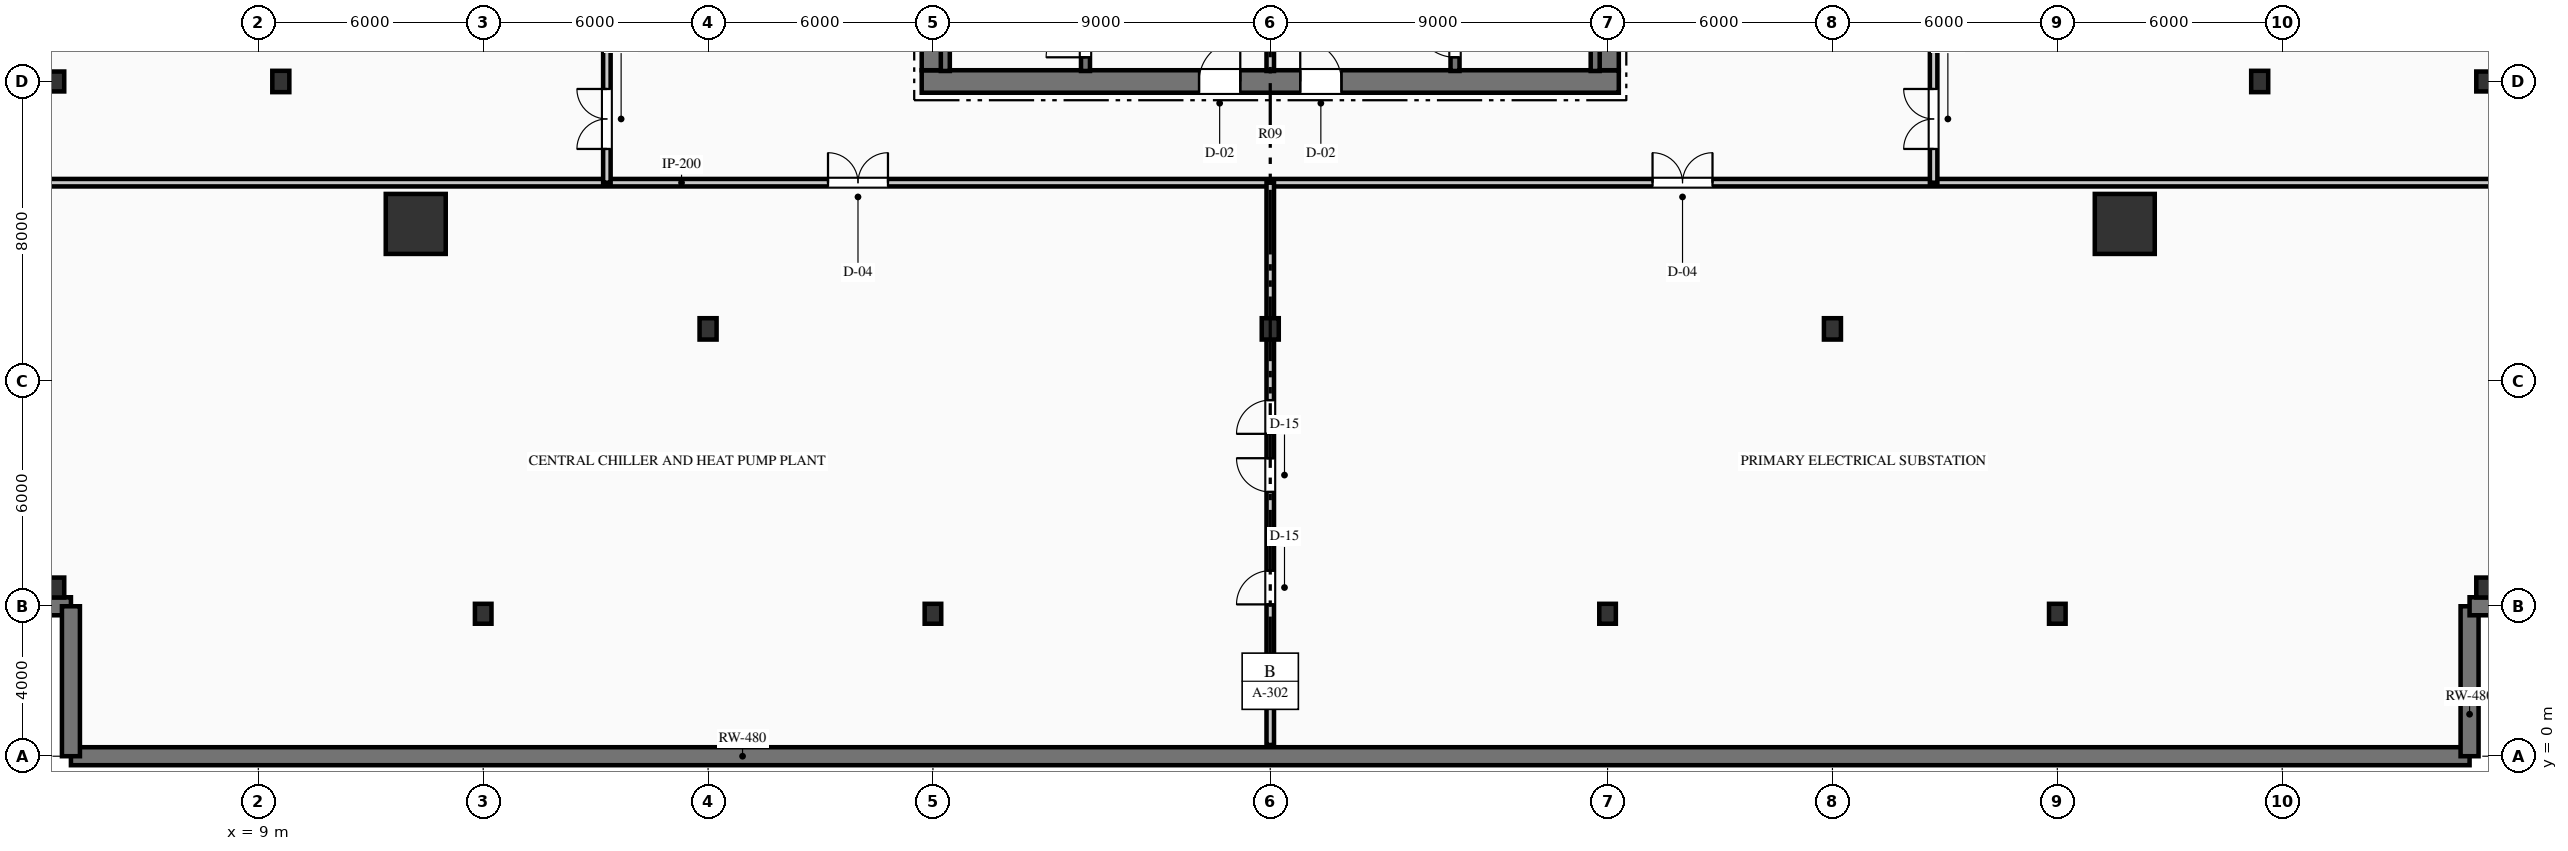
"""IFC4 building model, lengths in metres.
Left out: names, types, materials, properties, quantities, classifications, styles, units other than length and angle.
Written with IfcOpenShell. Run it as: python <this file> out.ifc"""

import sys

from ifc_helpers import new_model, si_unit, direction, frame, frame_2d, origin, origin_2d, place, context, subcontext, project, spatial, rectangle, hollow_rectangle, i_section, extrude, element, fill, save


model = new_model("IFC4")
c1 = context("Model", 3, precision=1e-05, world=origin(), true_north=direction((0.0, 1.0)))
c2 = subcontext(c1, "Body", "Model", "MODEL_VIEW")
j1 = project(units=[si_unit("LENGTHUNIT", "METRE"), si_unit("PLANEANGLEUNIT", "RADIAN")], contexts=[c1])
p1 = place(None, origin())
s1 = spatial("IfcSite", under=j1, at=p1, CompositionType="ELEMENT")
p2 = place(p1, origin())
s2 = spatial("IfcBuilding", under=s1, at=p2, CompositionType="ELEMENT")
p3 = place(p2, frame((0.0, 0.0, -5.2)))
s3 = spatial("IfcBuildingStorey", under=s2, at=p3, CompositionType="ELEMENT", Elevation=-5.2)
p4 = place(p3, frame((26.7, 18.0, -0.3), z_axis=(0.0, 0.0, 1.0), x_axis=(1.0, 0.0, 0.0)))
e1 = element("IfcWall", 1, at=p4, inside=s3, PredefinedType="SHEAR", context=c2, shape_type="SweptSolid", body=[
    extrude(rectangle(XDim=18.6, YDim=0.6, at=frame_2d((9.3, 0.0))), origin(), (0.0, 0.0, 1.0), 5.5),
])
p5 = place(p4, frame((7.4, 0.0, 0.3)))
e2 = element("IfcOpeningElement", 2, at=p5, cuts=e1, PredefinedType="OPENING", context=c2, shape_type="SweptSolid", body=[
    extrude(rectangle(XDim=1.1, YDim=2.15, at=frame_2d((0.55, 1.075))), frame((0.0, 0.31, 0.0), z_axis=(0.0, -1.0, 0.0), x_axis=(1.0, 0.0, 0.0)), (0.0, 0.0, 1.0), 0.62),
])
p6 = place(p4, frame((10.1, 0.0, 0.3)))
e3 = element("IfcOpeningElement", 3, at=p6, cuts=e1, PredefinedType="OPENING", context=c2, shape_type="SweptSolid", body=[
    extrude(rectangle(XDim=1.1, YDim=2.15, at=frame_2d((0.55, 1.075))), frame((0.0, 0.31, 0.0), z_axis=(0.0, -1.0, 0.0), x_axis=(1.0, 0.0, 0.0)), (0.0, 0.0, 1.0), 0.62),
])
p7 = place(p3, frame((27.0, 18.3, -0.3), z_axis=(0.0, 0.0, 1.0), x_axis=(0.0, 1.0, 0.0)))
e4 = element("IfcWall", 4, at=p7, inside=s3, PredefinedType="SHEAR", context=c2, shape_type="SweptSolid", body=[
    extrude(rectangle(XDim=15.4, YDim=0.6, at=frame_2d((7.7, 0.0))), origin(), (0.0, 0.0, 1.0), 5.5),
])
p8 = place(p7, frame((9.94, 0.0, 0.3)))
e5 = element("IfcOpeningElement", 5, at=p8, cuts=e4, PredefinedType="OPENING", context=c2, shape_type="SweptSolid", body=[
    extrude(rectangle(XDim=1.4, YDim=2.2, at=frame_2d((0.7, 1.1))), frame((0.0, 0.31, 0.0), z_axis=(0.0, -1.0, 0.0), x_axis=(1.0, 0.0, 0.0)), (0.0, 0.0, 1.0), 0.62),
])
p9 = place(p3, frame((45.0, 18.3, -0.3), z_axis=(0.0, 0.0, 1.0), x_axis=(0.0, 1.0, 0.0)))
e6 = element("IfcWall", 6, at=p9, inside=s3, PredefinedType="SHEAR", context=c2, shape_type="SweptSolid", body=[
    extrude(rectangle(XDim=15.4, YDim=0.6, at=frame_2d((7.7, 0.0))), origin(), (0.0, 0.0, 1.0), 5.5),
])
p10 = place(p9, frame((9.94, 0.0, 0.3)))
e7 = element("IfcOpeningElement", 7, at=p10, cuts=e6, PredefinedType="OPENING", context=c2, shape_type="SweptSolid", body=[
    extrude(rectangle(XDim=1.4, YDim=2.2, at=frame_2d((0.7, 1.1))), frame((0.0, 0.31, 0.0), z_axis=(0.0, -1.0, 0.0), x_axis=(1.0, 0.0, 0.0)), (0.0, 0.0, 1.0), 0.62),
])
p11 = place(p3, frame((31.07, 18.28, -0.3), z_axis=(0.0, 0.0, 1.0), x_axis=(0.0, 1.0, 0.0)))
e8 = element("IfcWall", 8, at=p11, inside=s3, PredefinedType="SHEAR", context=c2, shape_type="SweptSolid", body=[
    extrude(rectangle(XDim=8.26, YDim=0.24, at=frame_2d((4.13, 0.0))), origin(), (0.0, 0.0, 1.0), 5.5),
])
p12 = place(p11, frame((0.365, 0.0, 0.3)))
e9 = element("IfcOpeningElement", 9, at=p12, cuts=e8, PredefinedType="OPENING", context=c2, shape_type="SweptSolid", body=[
    extrude(rectangle(XDim=1.05, YDim=2.15, at=frame_2d((0.525, 1.075))), frame((0.0, 0.13, 0.0), z_axis=(0.0, -1.0, 0.0), x_axis=(1.0, 0.0, 0.0)), (0.0, 0.0, 1.0), 0.26),
])
p13 = place(p3, frame((27.33, 18.28, -0.3), z_axis=(0.0, 0.0, 1.0), x_axis=(0.0, 1.0, 0.0)))
e10 = element("IfcWall", 10, at=p13, inside=s3, PredefinedType="SHEAR", context=c2, shape_type="SweptSolid", body=[
    extrude(rectangle(XDim=8.26, YDim=0.24, at=frame_2d((4.13, 0.0))), origin(), (0.0, 0.0, 1.0), 5.5),
])
p14 = place(p3, frame((40.93, 18.28, -0.3), z_axis=(0.0, 0.0, 1.0), x_axis=(0.0, 1.0, 0.0)))
e11 = element("IfcWall", 11, at=p14, inside=s3, PredefinedType="SHEAR", context=c2, shape_type="SweptSolid", body=[
    extrude(rectangle(XDim=8.26, YDim=0.24, at=frame_2d((4.13, 0.0))), origin(), (0.0, 0.0, 1.0), 5.5),
])
p15 = place(p14, frame((0.365, 0.0, 0.3)))
e12 = element("IfcOpeningElement", 12, at=p15, cuts=e11, PredefinedType="OPENING", context=c2, shape_type="SweptSolid", body=[
    extrude(rectangle(XDim=1.05, YDim=2.15, at=frame_2d((0.525, 1.075))), frame((0.0, 0.13, 0.0), z_axis=(0.0, -1.0, 0.0), x_axis=(1.0, 0.0, 0.0)), (0.0, 0.0, 1.0), 0.26),
])
p16 = place(p3, frame((44.67, 18.28, -0.3), z_axis=(0.0, 0.0, 1.0), x_axis=(0.0, 1.0, 0.0)))
e13 = element("IfcWall", 13, at=p16, inside=s3, PredefinedType="SHEAR", context=c2, shape_type="SweptSolid", body=[
    extrude(rectangle(XDim=8.26, YDim=0.24, at=frame_2d((4.13, 0.0))), origin(), (0.0, 0.0, 1.0), 5.5),
])
p17 = place(p3, frame((4.0, 0.0, -0.3), z_axis=(0.0, 0.0, 1.0), x_axis=(1.0, 0.0, 0.0)))
e14 = element("IfcWall", 14, at=p17, inside=s3, PredefinedType="SHEAR", context=c2, shape_type="SweptSolid", body=[
    extrude(rectangle(XDim=64.0, YDim=0.48, at=frame_2d((32.0, 0.0))), origin(), (0.0, 0.0, 1.0), 5.5),
])
for number, where, z_axis, x_axis in (
    (15, (68.0, 0.0, -0.3), (0.0, 0.0, 1.0), (0.0, 1.0, 0.0)),
    (16, (68.0, 4.0, -0.3), (0.0, 0.0, 1.0), (1.0, 0.0, 0.0)),
    (17, (0.0, 4.0, -0.3), (0.0, 0.0, 1.0), (1.0, 0.0, 0.0)),
    (18, (4.0, 4.0, -0.3), (0.0, 0.0, 1.0), (0.0, -1.0, 0.0)),
):
    element("IfcWall", number, at=place(p3, frame(where, z_axis=z_axis, x_axis=x_axis)), inside=s3, PredefinedType="SHEAR", context=c2, shape_type="SweptSolid", body=[
        extrude(rectangle(XDim=4.0, YDim=0.48, at=frame_2d((2.0, 0.0))), origin(), (0.0, 0.0, 1.0), 5.5),
    ])
for number, where, z_axis, x_axis in (
    (19, (13.2, 14.2, -0.3), (0.0, 0.0, 1.0), (1.0, 0.0, 0.0)),
    (20, (58.8, 14.2, -0.3), (0.0, 0.0, 1.0), (1.0, 0.0, 0.0)),
):
    element("IfcColumn", number, at=place(p3, frame(where, z_axis=z_axis, x_axis=x_axis)), inside=s3, PredefinedType="COLUMN", context=c2, shape_type="SweptSolid", body=[
        extrude(hollow_rectangle(XDim=1.6, YDim=1.6, WallThickness=0.08, at=origin_2d()), origin(), (0.0, 0.0, 1.0), 5.5),
    ])
for number, where, z_axis, x_axis in (
    (21, (9.6, 18.0, -0.3), (0.0, 0.0, 1.0), (1.0, 0.0, 0.0)),
    (22, (62.4, 18.0, -0.3), (0.0, 0.0, 1.0), (1.0, 0.0, 0.0)),
    (23, (21.0, 11.4, -0.3), (0.0, 0.0, 1.0), (1.0, 0.0, 0.0)),
    (24, (51.0, 11.4, -0.3), (0.0, 0.0, 1.0), (1.0, 0.0, 0.0)),
    (25, (36.0, 11.4, -0.3), (0.0, 0.0, 1.0), (1.0, 0.0, 0.0)),
):
    element("IfcColumn", number, at=place(p3, frame(where, z_axis=z_axis, x_axis=x_axis)), inside=s3, PredefinedType="COLUMN", context=c2, shape_type="SweptSolid", body=[
        extrude(i_section(OverallWidth=0.454, OverallDepth=0.569, WebThickness=0.078, FlangeThickness=0.125, at=origin_2d()), origin(), (0.0, 0.0, 1.0), 5.5),
    ])
for number, where, z_axis, x_axis in (
    (26, (3.6, 18.0, -0.3), (0.0, 0.0, 1.0), (1.0, 0.0, 0.0)),
    (27, (3.6, 4.5, -0.3), (0.0, 0.0, 1.0), (1.0, 0.0, 0.0)),
    (28, (68.4, 18.0, -0.3), (0.0, 0.0, 1.0), (1.0, 0.0, 0.0)),
    (29, (68.4, 4.5, -0.3), (0.0, 0.0, 1.0), (1.0, 0.0, 0.0)),
    (30, (15.0, 3.8, -0.3), (0.0, 0.0, 1.0), (1.0, 0.0, 0.0)),
    (31, (27.0, 3.8, -0.3), (0.0, 0.0, 1.0), (1.0, 0.0, 0.0)),
    (32, (45.0, 3.8, -0.3), (0.0, 0.0, 1.0), (1.0, 0.0, 0.0)),
    (33, (57.0, 3.8, -0.3), (0.0, 0.0, 1.0), (1.0, 0.0, 0.0)),
):
    element("IfcColumn", number, at=place(p3, frame(where, z_axis=z_axis, x_axis=x_axis)), inside=s3, PredefinedType="COLUMN", context=c2, shape_type="SweptSolid", body=[
        extrude(i_section(OverallWidth=0.442, OverallDepth=0.531, WebThickness=0.066, FlangeThickness=0.106, at=origin_2d()), origin(), (0.0, 0.0, 1.0), 5.5),
    ])
p18 = place(p3, frame((36.0, 18.28, 0.0), z_axis=(0.0, 0.0, 1.0), x_axis=(0.0, 1.0, 0.0)))
e34 = element("IfcWall", 34, at=p18, inside=s3, PredefinedType="PARTITIONING", context=c2, shape_type="SweptSolid", body=[
    extrude(rectangle(XDim=3.77, YDim=0.2, at=frame_2d((1.885, 0.0))), origin(), (0.0, 0.0, 1.0), 4.84),
])
p19 = place(p3, frame((0.3, 15.3, 0.0), z_axis=(0.0, 0.0, 1.0), x_axis=(1.0, 0.0, 0.0)))
e35 = element("IfcWall", 35, at=p19, inside=s3, PredefinedType="PARTITIONING", context=c2, shape_type="SweptSolid", body=[
    extrude(rectangle(XDim=71.4, YDim=0.2, at=frame_2d((35.7, 0.0))), origin(), (0.0, 0.0, 1.0), 3.935),
])
p20 = place(p19, frame((23.9, 0.0, 0.0)))
e36 = element("IfcOpeningElement", 36, at=p20, cuts=e35, PredefinedType="OPENING", context=c2, shape_type="SweptSolid", body=[
    extrude(rectangle(XDim=1.6, YDim=2.2, at=frame_2d((0.8, 1.1))), frame((0.0, 0.11, 0.0), z_axis=(0.0, -1.0, 0.0), x_axis=(1.0, 0.0, 0.0)), (0.0, 0.0, 1.0), 0.22),
])
p21 = place(p19, frame((45.9, 0.0, 0.0)))
e37 = element("IfcOpeningElement", 37, at=p21, cuts=e35, PredefinedType="OPENING", context=c2, shape_type="SweptSolid", body=[
    extrude(rectangle(XDim=1.6, YDim=2.2, at=frame_2d((0.8, 1.1))), frame((0.0, 0.11, 0.0), z_axis=(0.0, -1.0, 0.0), x_axis=(1.0, 0.0, 0.0)), (0.0, 0.0, 1.0), 0.22),
])
p22 = place(p3, frame((18.3, 15.3, 0.0), z_axis=(0.0, 0.0, 1.0), x_axis=(0.0, 1.0, 0.0)))
e38 = element("IfcWall", 38, at=p22, inside=s3, PredefinedType="PARTITIONING", context=c2, shape_type="SweptSolid", body=[
    extrude(rectangle(XDim=6.52, YDim=0.2, at=frame_2d((3.26, 0.0))), origin(), (0.0, 0.0, 1.0), 4.84),
])
p23 = place(p22, frame((0.9, 0.0, 0.0)))
e39 = element("IfcOpeningElement", 39, at=p23, cuts=e38, PredefinedType="OPENING", context=c2, shape_type="SweptSolid", body=[
    extrude(rectangle(XDim=1.6, YDim=2.2, at=frame_2d((0.8, 1.1))), frame((0.0, 0.11, 0.0), z_axis=(0.0, -1.0, 0.0), x_axis=(1.0, 0.0, 0.0)), (0.0, 0.0, 1.0), 0.22),
])
p24 = place(p3, frame((53.7, 15.3, 0.0), z_axis=(0.0, 0.0, 1.0), x_axis=(0.0, 1.0, 0.0)))
e40 = element("IfcWall", 40, at=p24, inside=s3, PredefinedType="PARTITIONING", context=c2, shape_type="SweptSolid", body=[
    extrude(rectangle(XDim=6.52, YDim=0.2, at=frame_2d((3.26, 0.0))), origin(), (0.0, 0.0, 1.0), 4.84),
])
p25 = place(p24, frame((0.9, 0.0, 0.0)))
e41 = element("IfcOpeningElement", 41, at=p25, cuts=e40, PredefinedType="OPENING", context=c2, shape_type="SweptSolid", body=[
    extrude(rectangle(XDim=1.6, YDim=2.2, at=frame_2d((0.8, 1.1))), frame((0.0, 0.11, 0.0), z_axis=(0.0, -1.0, 0.0), x_axis=(1.0, 0.0, 0.0)), (0.0, 0.0, 1.0), 0.22),
])
p26 = place(p3, frame((36.0, 0.3, 0.0), z_axis=(0.0, 0.0, 1.0), x_axis=(0.0, 1.0, 0.0)))
e42 = element("IfcWall", 42, at=p26, inside=s3, PredefinedType="PARTITIONING", context=c2, shape_type="SweptSolid", body=[
    extrude(rectangle(XDim=15.0, YDim=0.2, at=frame_2d((7.5, 0.0))), origin(), (0.0, 0.0, 1.0), 3.973),
])
p27 = place(p26, frame((3.75, 0.0, 0.0)))
e43 = element("IfcOpeningElement", 43, at=p27, cuts=e42, PredefinedType="OPENING", context=c2, shape_type="SweptSolid", body=[
    extrude(rectangle(XDim=0.9, YDim=2.05, at=frame_2d((0.45, 1.025))), frame((0.0, 0.11, 0.0), z_axis=(0.0, -1.0, 0.0), x_axis=(1.0, 0.0, 0.0)), (0.0, 0.0, 1.0), 0.22),
])
p28 = place(p26, frame((6.75, 0.0, 0.0)))
e44 = element("IfcOpeningElement", 44, at=p28, cuts=e42, PredefinedType="OPENING", context=c2, shape_type="SweptSolid", body=[
    extrude(rectangle(XDim=0.9, YDim=2.05, at=frame_2d((0.45, 1.025))), frame((0.0, 0.11, 0.0), z_axis=(0.0, -1.0, 0.0), x_axis=(1.0, 0.0, 0.0)), (0.0, 0.0, 1.0), 0.22),
])
p29 = place(p26, frame((8.3, 0.0, 0.0)))
e45 = element("IfcOpeningElement", 45, at=p29, cuts=e42, PredefinedType="OPENING", context=c2, shape_type="SweptSolid", body=[
    extrude(rectangle(XDim=0.9, YDim=2.05, at=frame_2d((0.45, 1.025))), frame((0.0, 0.11, 0.0), z_axis=(0.0, -1.0, 0.0), x_axis=(1.0, 0.0, 0.0)), (0.0, 0.0, 1.0), 0.22),
])
p30 = place(p12, origin())
e46 = element("IfcDoor", 46, at=p30, inside=s3, OperationType="SINGLE_SWING_LEFT", PredefinedType="DOOR", context=c2, shape_type="SweptSolid", body=[
    extrude(rectangle(XDim=1.05, YDim=2.15, at=frame_2d((0.525, 1.075))), frame((0.0, 0.025, 0.0), z_axis=(0.0, -1.0, 0.0), x_axis=(1.0, 0.0, 0.0)), (0.0, 0.0, 1.0), 0.05),
])
fill(e9, e46)
p31 = place(p15, origin())
e47 = element("IfcDoor", 47, at=p31, inside=s3, OperationType="SINGLE_SWING_RIGHT", PredefinedType="DOOR", context=c2, shape_type="SweptSolid", body=[
    extrude(rectangle(XDim=1.05, YDim=2.15, at=frame_2d((0.525, 1.075))), frame((0.0, 0.025, 0.0), z_axis=(0.0, -1.0, 0.0), x_axis=(1.0, 0.0, 0.0)), (0.0, 0.0, 1.0), 0.05),
])
fill(e12, e47)
p32 = place(p5, origin())
e48 = element("IfcDoor", 48, at=p32, inside=s3, OperationType="SINGLE_SWING_RIGHT", PredefinedType="DOOR", context=c2, shape_type="SweptSolid", body=[
    extrude(rectangle(XDim=1.1, YDim=2.15, at=frame_2d((0.55, 1.075))), frame((0.0, 0.025, 0.0), z_axis=(0.0, -1.0, 0.0), x_axis=(1.0, 0.0, 0.0)), (0.0, 0.0, 1.0), 0.05),
])
fill(e2, e48)
p33 = place(p6, origin())
e49 = element("IfcDoor", 49, at=p33, inside=s3, OperationType="SINGLE_SWING_LEFT", PredefinedType="DOOR", context=c2, shape_type="SweptSolid", body=[
    extrude(rectangle(XDim=1.1, YDim=2.15, at=frame_2d((0.55, 1.075))), frame((0.0, 0.025, 0.0), z_axis=(0.0, -1.0, 0.0), x_axis=(1.0, 0.0, 0.0)), (0.0, 0.0, 1.0), 0.05),
])
fill(e3, e49)
p34 = place(p20, origin())
e50 = element("IfcDoor", 50, at=p34, inside=s3, OperationType="DOUBLE_DOOR_SINGLE_SWING", PredefinedType="DOOR", context=c2, shape_type="SweptSolid", body=[
    extrude(rectangle(XDim=1.6, YDim=2.2, at=frame_2d((0.8, 1.1))), frame((0.0, 0.025, 0.0), z_axis=(0.0, -1.0, 0.0), x_axis=(1.0, 0.0, 0.0)), (0.0, 0.0, 1.0), 0.05),
])
fill(e36, e50)
p35 = place(p21, origin())
e51 = element("IfcDoor", 51, at=p35, inside=s3, OperationType="DOUBLE_DOOR_SINGLE_SWING", PredefinedType="DOOR", context=c2, shape_type="SweptSolid", body=[
    extrude(rectangle(XDim=1.6, YDim=2.2, at=frame_2d((0.8, 1.1))), frame((0.0, 0.025, 0.0), z_axis=(0.0, -1.0, 0.0), x_axis=(1.0, 0.0, 0.0)), (0.0, 0.0, 1.0), 0.05),
])
fill(e37, e51)
p36 = place(p23, origin())
e52 = element("IfcDoor", 52, at=p36, inside=s3, OperationType="DOUBLE_DOOR_SINGLE_SWING", PredefinedType="DOOR", context=c2, shape_type="SweptSolid", body=[
    extrude(rectangle(XDim=1.6, YDim=2.2, at=frame_2d((0.8, 1.1))), frame((0.0, 0.025, 0.0), z_axis=(0.0, -1.0, 0.0), x_axis=(1.0, 0.0, 0.0)), (0.0, 0.0, 1.0), 0.05),
])
fill(e39, e52)
p37 = place(p25, origin())
e53 = element("IfcDoor", 53, at=p37, inside=s3, OperationType="DOUBLE_DOOR_SINGLE_SWING", PredefinedType="DOOR", context=c2, shape_type="SweptSolid", body=[
    extrude(rectangle(XDim=1.6, YDim=2.2, at=frame_2d((0.8, 1.1))), frame((0.0, 0.025, 0.0), z_axis=(0.0, -1.0, 0.0), x_axis=(1.0, 0.0, 0.0)), (0.0, 0.0, 1.0), 0.05),
])
fill(e41, e53)
p38 = place(p27, origin())
e54 = element("IfcDoor", 54, at=p38, inside=s3, OperationType="SINGLE_SWING_LEFT", PredefinedType="DOOR", context=c2, shape_type="SweptSolid", body=[
    extrude(rectangle(XDim=0.9, YDim=2.05, at=frame_2d((0.45, 1.025))), frame((0.0, 0.025, 0.0), z_axis=(0.0, -1.0, 0.0), x_axis=(1.0, 0.0, 0.0)), (0.0, 0.0, 1.0), 0.05),
])
fill(e43, e54)
p39 = place(p28, origin())
e55 = element("IfcDoor", 55, at=p39, inside=s3, OperationType="SINGLE_SWING_RIGHT", PredefinedType="DOOR", context=c2, shape_type="SweptSolid", body=[
    extrude(rectangle(XDim=0.9, YDim=2.05, at=frame_2d((0.45, 1.025))), frame((0.0, 0.025, 0.0), z_axis=(0.0, -1.0, 0.0), x_axis=(1.0, 0.0, 0.0)), (0.0, 0.0, 1.0), 0.05),
])
fill(e44, e55)
p40 = place(p29, origin())
e56 = element("IfcDoor", 56, at=p40, inside=s3, OperationType="SINGLE_SWING_LEFT", PredefinedType="DOOR", context=c2, shape_type="SweptSolid", body=[
    extrude(rectangle(XDim=0.9, YDim=2.05, at=frame_2d((0.45, 1.025))), frame((0.0, 0.025, 0.0), z_axis=(0.0, -1.0, 0.0), x_axis=(1.0, 0.0, 0.0)), (0.0, 0.0, 1.0), 0.05),
])
fill(e45, e56)
save(model, sys.argv[1])
